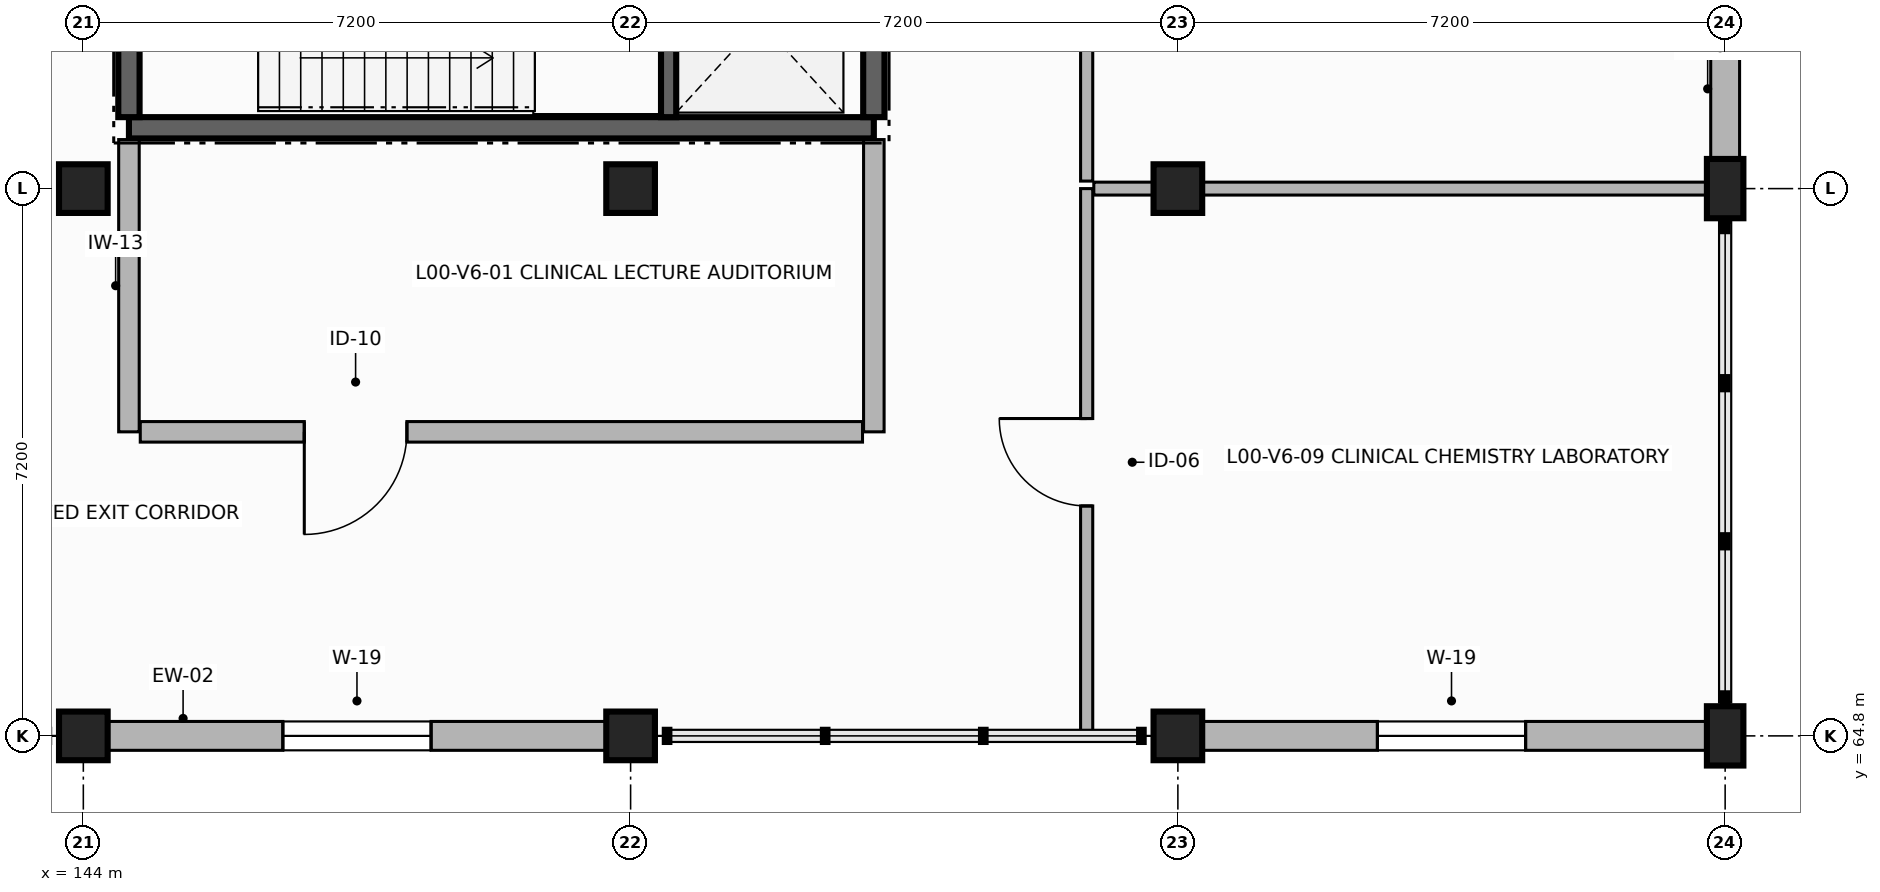
"""IFC4 building model, lengths in metres.
Left out: names, types, materials, properties, quantities, classifications, styles, units other than length and angle.
Written with IfcOpenShell. Run it as: python <this file> out.ifc"""

import sys

from ifc_helpers import new_model, si_unit, direction, frame, frame_2d, origin, origin_2d, place, context, subcontext, project, spatial, rectangle, extrude, element, fill, save


model = new_model("IFC4")
c1 = context("Model", 3, precision=1e-05, world=origin(), true_north=direction((0.0, 1.0)))
c2 = subcontext(c1, "Body", "Model", "MODEL_VIEW")
j1 = project(units=[si_unit("LENGTHUNIT", "METRE"), si_unit("PLANEANGLEUNIT", "RADIAN")], contexts=[c1])
p1 = place(None, origin())
s1 = spatial("IfcSite", under=j1, at=p1, CompositionType="ELEMENT")
p2 = place(p1, origin())
s2 = spatial("IfcBuilding", under=s1, at=p2, CompositionType="ELEMENT")
p3 = place(p2, origin())
s3 = spatial("IfcBuildingStorey", under=s2, at=p3, CompositionType="ELEMENT", Elevation=0.0)
for number, where, z_axis, x_axis in (
    (1, (144.0, 64.8, -0.38), (0.0, 0.0, 1.0), (1.0, 0.0, 0.0)),
    (2, (144.0, 72.0, -0.38), (0.0, 0.0, 1.0), (1.0, 0.0, 0.0)),
    (3, (151.2, 64.8, -0.38), (0.0, 0.0, 1.0), (1.0, 0.0, 0.0)),
    (4, (151.2, 72.0, -0.38), (0.0, 0.0, 1.0), (1.0, 0.0, 0.0)),
    (5, (158.4, 64.8, -0.38), (0.0, 0.0, 1.0), (1.0, 0.0, 0.0)),
    (6, (158.4, 72.0, -0.38), (0.0, 0.0, 1.0), (1.0, 0.0, 0.0)),
):
    element("IfcColumn", number, at=place(p3, frame(where, z_axis=z_axis, x_axis=x_axis)), inside=s3, PredefinedType="COLUMN", context=c2, shape_type="SweptSolid", body=[
        extrude(rectangle(XDim=0.64, YDim=0.64, at=origin_2d()), origin(), (0.0, 0.0, 1.0), 4.56),
    ])
for number, where, z_axis, x_axis in (
    (7, (165.6, 64.8, -0.38), (0.0, 0.0, 1.0), (1.0, 0.0, 0.0)),
    (8, (165.6, 72.0, -0.38), (0.0, 0.0, 1.0), (1.0, 0.0, 0.0)),
):
    element("IfcColumn", number, at=place(p3, frame(where, z_axis=z_axis, x_axis=x_axis)), inside=s3, PredefinedType="PILASTER", context=c2, shape_type="SweptSolid", body=[
        extrude(rectangle(XDim=0.48, YDim=0.78, at=origin_2d()), origin(), (0.0, 0.0, 1.0), 4.56),
    ])
p4 = place(p3, frame((144.0, 64.8, 0.0), z_axis=(0.0, 0.0, 1.0), x_axis=(1.0, 0.0, 0.0)))
e9 = element("IfcWall", 9, at=p4, inside=s3, PredefinedType="SOLIDWALL", context=c2, shape_type="SweptSolid", body=[
    extrude(rectangle(XDim=7.2, YDim=0.38, at=frame_2d((3.6, 0.0))), origin(), (0.0, 0.0, 1.0), 3.51),
])
p5 = place(p4, frame((2.625, 0.0, 0.85)))
e10 = element("IfcOpeningElement", 10, at=p5, cuts=e9, PredefinedType="OPENING", context=c2, shape_type="SweptSolid", body=[
    extrude(rectangle(XDim=1.95, YDim=2.4, at=frame_2d((0.975, 1.2))), frame((0.0, 0.2, 0.0), z_axis=(0.0, -1.0, 0.0), x_axis=(1.0, 0.0, 0.0)), (0.0, 0.0, 1.0), 0.4),
])
p6 = place(p3, frame((158.4, 64.8, 0.0), z_axis=(0.0, 0.0, 1.0), x_axis=(1.0, 0.0, 0.0)))
e11 = element("IfcWall", 11, at=p6, inside=s3, PredefinedType="SOLIDWALL", context=c2, shape_type="SweptSolid", body=[
    extrude(rectangle(XDim=7.2, YDim=0.38, at=frame_2d((3.6, 0.0))), origin(), (0.0, 0.0, 1.0), 3.51),
])
p7 = place(p6, frame((2.625, 0.0, 0.85)))
e12 = element("IfcOpeningElement", 12, at=p7, cuts=e11, PredefinedType="OPENING", context=c2, shape_type="SweptSolid", body=[
    extrude(rectangle(XDim=1.95, YDim=2.4, at=frame_2d((0.975, 1.2))), frame((0.0, 0.2, 0.0), z_axis=(0.0, -1.0, 0.0), x_axis=(1.0, 0.0, 0.0)), (0.0, 0.0, 1.0), 0.4),
])
p8 = place(p3, frame((165.6, 72.0, 0.0), z_axis=(0.0, 0.0, 1.0), x_axis=(0.0, 1.0, 0.0)))
e13 = element("IfcWall", 13, at=p8, inside=s3, PredefinedType="SOLIDWALL", context=c2, shape_type="SweptSolid", body=[
    extrude(rectangle(XDim=7.2, YDim=0.38, at=frame_2d((3.6, 0.0))), origin(), (0.0, 0.0, 1.0), 3.51),
])
p9 = place(p8, frame((2.625, 0.0, 0.85)))
e14 = element("IfcOpeningElement", 14, at=p9, cuts=e13, PredefinedType="OPENING", context=c2, shape_type="SweptSolid", body=[
    extrude(rectangle(XDim=1.95, YDim=2.4, at=frame_2d((0.975, 1.2))), frame((0.0, 0.2, 0.0), z_axis=(0.0, -1.0, 0.0), x_axis=(1.0, 0.0, 0.0)), (0.0, 0.0, 1.0), 0.4),
])
p10 = place(p3, frame((144.6, 72.8, 0.0), z_axis=(0.0, 0.0, 1.0), x_axis=(1.0, 0.0, 0.0)))
e15 = element("IfcWall", 15, at=p10, inside=s3, PredefinedType="SHEAR", context=c2, shape_type="SweptSolid", body=[
    extrude(rectangle(XDim=9.8, YDim=0.28, at=frame_2d((4.9, 0.0))), origin(), (0.0, 0.0, 1.0), 4.18),
])
p11 = place(p3, frame((154.4, 72.94, 0.0), z_axis=(0.0, 0.0, 1.0), x_axis=(0.0, 1.0, 0.0)))
e16 = element("IfcWall", 16, at=p11, inside=s3, PredefinedType="SHEAR", context=c2, shape_type="SweptSolid", body=[
    extrude(rectangle(XDim=5.52, YDim=0.28, at=frame_2d((2.76, 0.0))), origin(), (0.0, 0.0, 1.0), 4.18),
])
p12 = place(p11, frame((4.0, 0.0, 0.0)))
e17 = element("IfcOpeningElement", 17, at=p12, cuts=e16, PredefinedType="OPENING", context=c2, shape_type="SweptSolid", body=[
    extrude(rectangle(XDim=1.2, YDim=2.25, at=frame_2d((0.6, 1.125))), frame((0.0, 0.15, 0.0), z_axis=(0.0, -1.0, 0.0), x_axis=(1.0, 0.0, 0.0)), (0.0, 0.0, 1.0), 0.3),
])
p13 = place(p3, frame((144.6, 78.46, 0.0), z_axis=(0.0, 0.0, 1.0), x_axis=(0.0, -1.0, 0.0)))
e18 = element("IfcWall", 18, at=p13, inside=s3, PredefinedType="SHEAR", context=c2, shape_type="SweptSolid", body=[
    extrude(rectangle(XDim=5.52, YDim=0.28, at=frame_2d((2.76, 0.0))), origin(), (0.0, 0.0, 1.0), 4.18),
])
p14 = place(p3, frame((151.7, 72.94, 0.0), z_axis=(0.0, 0.0, 1.0), x_axis=(0.0, 1.0, 0.0)))
e19 = element("IfcWall", 19, at=p14, inside=s3, PredefinedType="SHEAR", context=c2, shape_type="SweptSolid", body=[
    extrude(rectangle(XDim=3.66, YDim=0.2, at=frame_2d((1.83, 0.0))), origin(), (0.0, 0.0, 1.0), 4.18),
])
for number, where, z_axis, x_axis in (
    (20, (144.6, 68.8, 0.0), (0.0, 0.0, 1.0), (0.0, 1.0, 0.0)),
    (21, (154.4, 72.645, 0.0), (0.0, 0.0, 1.0), (0.0, -1.0, 0.0)),
):
    element("IfcWall", number, at=place(p3, frame(where, z_axis=z_axis, x_axis=x_axis)), inside=s3, PredefinedType="PARTITIONING", context=c2, shape_type="SweptSolid", body=[
        extrude(rectangle(XDim=3.845, YDim=0.27, at=frame_2d((1.922, 0.0))), origin(), (0.0, 0.0, 1.0), 3.49),
    ])
p15 = place(p3, frame((154.251, 68.8, 0.0), z_axis=(0.0, 0.0, 1.0), x_axis=(-1.0, 0.0, 0.0)))
e22 = element("IfcWall", 22, at=p15, inside=s3, PredefinedType="PARTITIONING", context=c2, shape_type="SweptSolid", body=[
    extrude(rectangle(XDim=9.502, YDim=0.27, at=frame_2d((4.751, 0.0))), origin(), (0.0, 0.0, 1.0), 3.49),
])
p16 = place(p15, frame((5.994, 0.0, 0.0)))
e23 = element("IfcOpeningElement", 23, at=p16, cuts=e22, PredefinedType="OPENING", context=c2, shape_type="SweptSolid", body=[
    extrude(rectangle(XDim=1.35, YDim=2.25, at=frame_2d((0.675, 1.125))), frame((0.0, 0.145, 0.0), z_axis=(0.0, -1.0, 0.0), x_axis=(1.0, 0.0, 0.0)), (0.0, 0.0, 1.0), 0.29),
])
p17 = place(p3, frame((157.2, 64.8, 0.0), z_axis=(0.0, 0.0, 1.0), x_axis=(0.0, 1.0, 0.0)))
e24 = element("IfcWall", 24, at=p17, inside=s3, PredefinedType="PARTITIONING", context=c2, shape_type="SweptSolid", body=[
    extrude(rectangle(XDim=7.2, YDim=0.16, at=frame_2d((3.6, 0.0))), origin(), (0.0, 0.0, 1.0), 3.49),
])
p18 = place(p17, frame((3.025, 0.0, 0.0)))
e25 = element("IfcOpeningElement", 25, at=p18, cuts=e24, PredefinedType="OPENING", context=c2, shape_type="SweptSolid", body=[
    extrude(rectangle(XDim=1.15, YDim=2.25, at=frame_2d((0.575, 1.125))), frame((0.0, 0.09, 0.0), z_axis=(0.0, -1.0, 0.0), x_axis=(1.0, 0.0, 0.0)), (0.0, 0.0, 1.0), 0.18),
])
p19 = place(p3, frame((157.294, 72.0, 0.0), z_axis=(0.0, 0.0, 1.0), x_axis=(1.0, 0.0, 0.0)))
e26 = element("IfcWall", 26, at=p19, inside=s3, PredefinedType="PARTITIONING", context=c2, shape_type="SweptSolid", body=[
    extrude(rectangle(XDim=8.101, YDim=0.17, at=frame_2d((4.051, 0.0))), origin(), (0.0, 0.0, 1.0), 3.49),
])
p20 = place(p3, frame((157.2, 72.099, 0.0), z_axis=(0.0, 0.0, 1.0), x_axis=(0.0, 1.0, 0.0)))
e27 = element("IfcWall", 27, at=p20, inside=s3, PredefinedType="PARTITIONING", context=c2, shape_type="SweptSolid", body=[
    extrude(rectangle(XDim=7.101, YDim=0.16, at=frame_2d((3.55, 0.0))), origin(), (0.0, 0.0, 1.0), 3.49),
])
p21 = place(p20, frame((2.857, 0.0, 0.0)))
e28 = element("IfcOpeningElement", 28, at=p21, cuts=e27, PredefinedType="OPENING", context=c2, shape_type="SweptSolid", body=[
    extrude(rectangle(XDim=1.15, YDim=2.25, at=frame_2d((0.575, 1.125))), frame((0.0, 0.09, 0.0), z_axis=(0.0, -1.0, 0.0), x_axis=(1.0, 0.0, 0.0)), (0.0, 0.0, 1.0), 0.18),
])
p22 = place(p5, origin())
e29 = element("IfcWindow", 29, at=p22, inside=s3, PartitioningType="SINGLE_PANEL", PredefinedType="WINDOW", context=c2, shape_type="SweptSolid", body=[
    extrude(rectangle(XDim=1.95, YDim=2.4, at=frame_2d((0.975, 1.2))), frame((0.0, 0.03, 0.0), z_axis=(0.0, -1.0, 0.0), x_axis=(1.0, 0.0, 0.0)), (0.0, 0.0, 1.0), 0.06),
])
fill(e10, e29)
p23 = place(p7, origin())
e30 = element("IfcWindow", 30, at=p23, inside=s3, PartitioningType="SINGLE_PANEL", PredefinedType="WINDOW", context=c2, shape_type="SweptSolid", body=[
    extrude(rectangle(XDim=1.95, YDim=2.4, at=frame_2d((0.975, 1.2))), frame((0.0, 0.03, 0.0), z_axis=(0.0, -1.0, 0.0), x_axis=(1.0, 0.0, 0.0)), (0.0, 0.0, 1.0), 0.06),
])
fill(e12, e30)
p24 = place(p16, origin())
e31 = element("IfcDoor", 31, at=p24, inside=s3, OperationType="SINGLE_SWING_RIGHT", PredefinedType="DOOR", context=c2, shape_type="SweptSolid", body=[
    extrude(rectangle(XDim=1.35, YDim=2.25, at=frame_2d((0.675, 1.125))), frame((0.0, 0.025, 0.0), z_axis=(0.0, -1.0, 0.0), x_axis=(1.0, 0.0, 0.0)), (0.0, 0.0, 1.0), 0.05),
])
fill(e23, e31)
p25 = place(p18, origin())
e32 = element("IfcDoor", 32, at=p25, inside=s3, OperationType="SINGLE_SWING_RIGHT", PredefinedType="DOOR", context=c2, shape_type="SweptSolid", body=[
    extrude(rectangle(XDim=1.15, YDim=2.25, at=frame_2d((0.575, 1.125))), frame((0.0, 0.025, 0.0), z_axis=(0.0, -1.0, 0.0), x_axis=(1.0, 0.0, 0.0)), (0.0, 0.0, 1.0), 0.05),
])
fill(e25, e32)
save(model, sys.argv[1])
